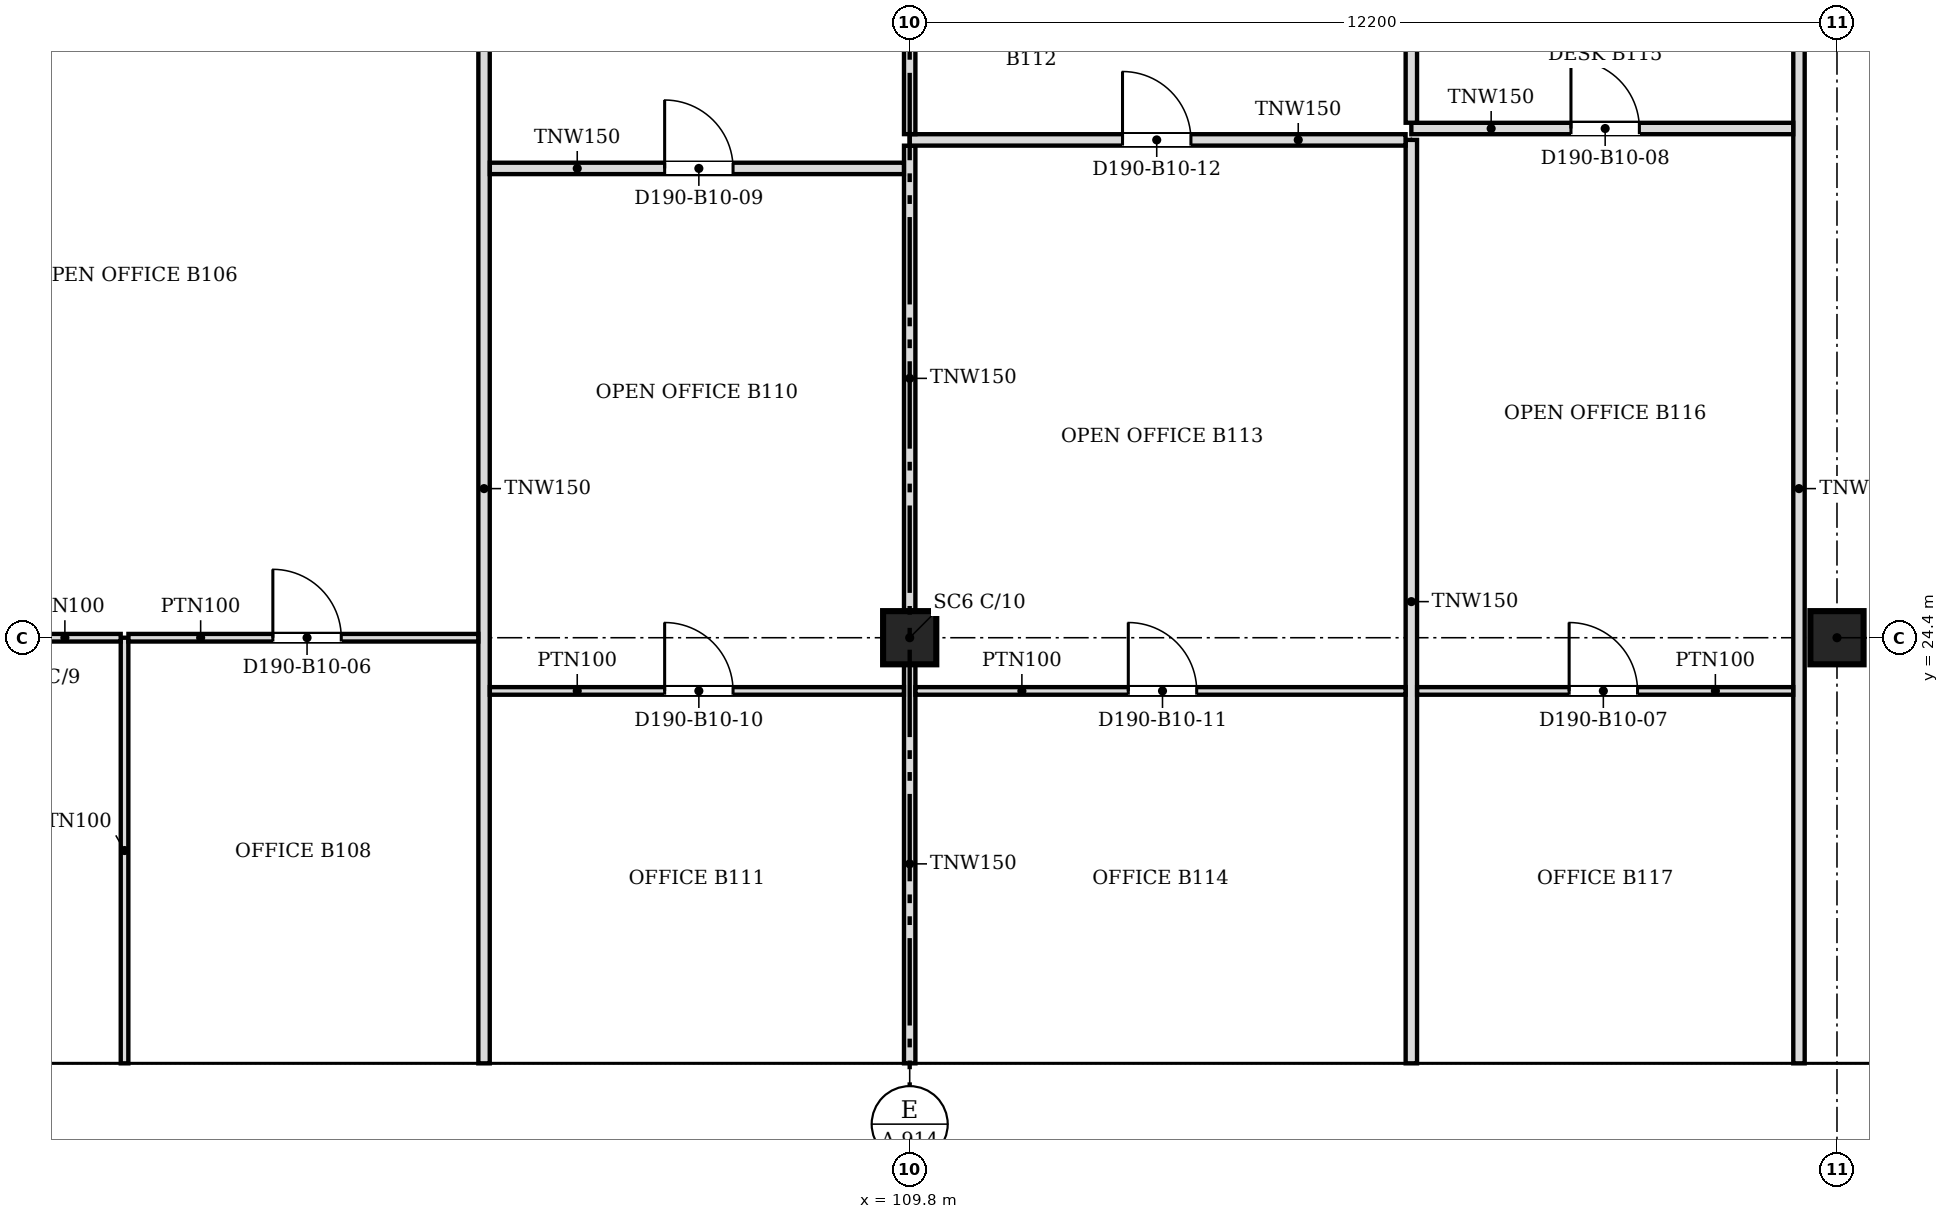
"""IFC4 building model, lengths in metres.
Left out: names, types, materials, properties, quantities, classifications, styles, units other than length and angle.
Written with IfcOpenShell. Run it as: python <this file> out.ifc"""

import sys

from ifc_helpers import new_model, si_unit, direction, frame, frame_2d, origin, origin_2d, place, context, subcontext, project, spatial, polyline, rectangle, outline, extrude, faceted_brep, source, transform, mapped, element, fill, save


model = new_model("IFC4")
c1 = context("Model", 3, precision=1e-05, world=origin(), true_north=direction((0.0, 1.0)))
c2 = subcontext(c1, "Body", "Model", "MODEL_VIEW")
j1 = project(units=[si_unit("LENGTHUNIT", "METRE"), si_unit("PLANEANGLEUNIT", "RADIAN")], contexts=[c1])
p1 = place(None, origin())
s1 = spatial("IfcSite", under=j1, at=p1, CompositionType="ELEMENT")
p2 = place(p1, origin())
s2 = spatial("IfcBuilding", under=s1, at=p2, CompositionType="ELEMENT")
p3 = place(p2, frame((0.0, 0.0, 95.2)))
s3 = spatial("IfcBuildingStorey", under=s2, at=p3, CompositionType="ELEMENT", Elevation=95.2)
for number, where, z_axis, x_axis in (
    (1, (109.8, 24.4, 0.0), (0.0, 0.0, 1.0), (1.0, 0.0, 0.0)),
    (2, (122.0, 24.4, 0.0), (0.0, 0.0, 1.0), (1.0, 0.0, 0.0)),
):
    element("IfcColumn", number, at=place(p3, frame(where, z_axis=z_axis, x_axis=x_axis)), inside=s3, PredefinedType="COLUMN", context=c2, shape_type="SweptSolid", body=[
        extrude(rectangle(XDim=0.7, YDim=0.7, at=origin_2d()), origin(), (0.0, 0.0, 1.0), 3.6),
    ])
m1 = source(origin(), c2, "Body", "Brep", [
    faceted_brep([(6.1, -0.25, 0.0), (3.05, -0.25, 3.8), (0.0, -0.25, 0.0), (6.1, -0.25, 0.0), (0.0, 0.25, 0.0), (3.05, 0.25, 3.8), (6.1, 0.25, 0.0), (6.1, 0.25, 0.0)], [[[0, 1, 2, 3]], [[4, 5, 6, 7]], [[6, 5, 1, 0]], [[5, 4, 2, 1]], [[4, 7, 3, 2]], [[3, 7, 6, 0]]]),
])
p4 = place(p3, frame((94.55, 18.55, 0.0), z_axis=(0.0, 0.0, 1.0), x_axis=(1.0, 0.0, 0.0)))
e3 = element("IfcWall", 3, at=p4, inside=s3, PredefinedType="SOLIDWALL", context=c2, shape_type="MappedRepresentation", body=[
    mapped(m1, transform((0.0, 0.0, 0.0), scale=1.0)),
])
m2 = source(origin(), c2, "Body", "SweptSolid", [
    extrude(outline(polyline([(5.579, 0.25), (3.05, 3.401), (0.521, 0.25), (5.579, 0.25)])), frame((0.0, 0.26, 0.0), z_axis=(0.0, -1.0, 0.0), x_axis=(1.0, 0.0, 0.0)), (0.0, 0.0, 1.0), 0.52),
])
p5 = place(p4, origin())
e4 = element("IfcOpeningElement", 4, at=p5, cuts=e3, PredefinedType="OPENING", context=c2, shape_type="MappedRepresentation", body=[
    mapped(m2, transform((0.0, 0.0, 0.0), scale=1.0)),
])
m3 = source(origin(), c2, "Body", "SweptSolid", [
    extrude(outline(polyline([(6.1, 0.0), (3.05, 3.8), (0.0, 0.0), (6.1, 0.0)])), frame((0.0, 0.25, 0.0), z_axis=(0.0, -1.0, 0.0), x_axis=(1.0, 0.0, 0.0)), (0.0, 0.0, 1.0), 0.5),
])
p6 = place(p3, frame((100.65, 18.55, 0.0), z_axis=(0.0, 0.0, 1.0), x_axis=(1.0, 0.0, 0.0)))
e5 = element("IfcWall", 5, at=p6, inside=s3, PredefinedType="SOLIDWALL", context=c2, shape_type="MappedRepresentation", body=[
    mapped(m3, transform((0.0, 0.0, 0.0), scale=1.0)),
])
p7 = place(p6, origin())
e6 = element("IfcOpeningElement", 6, at=p7, cuts=e5, PredefinedType="OPENING", context=c2, shape_type="MappedRepresentation", body=[
    mapped(m2, transform((0.0, 0.0, 0.0), scale=1.0)),
])
p8 = place(p3, frame((106.75, 18.55, 0.0), z_axis=(0.0, 0.0, 1.0), x_axis=(1.0, 0.0, 0.0)))
e7 = element("IfcWall", 7, at=p8, inside=s3, PredefinedType="SOLIDWALL", context=c2, shape_type="MappedRepresentation", body=[
    mapped(m3, transform((0.0, 0.0, 0.0), scale=1.0)),
])
p9 = place(p8, origin())
e8 = element("IfcOpeningElement", 8, at=p9, cuts=e7, PredefinedType="OPENING", context=c2, shape_type="MappedRepresentation", body=[
    mapped(m2, transform((0.0, 0.0, 0.0), scale=1.0)),
])
p10 = place(p3, frame((112.85, 18.55, 0.0), z_axis=(0.0, 0.0, 1.0), x_axis=(1.0, 0.0, 0.0)))
e9 = element("IfcWall", 9, at=p10, inside=s3, PredefinedType="SOLIDWALL", context=c2, shape_type="MappedRepresentation", body=[
    mapped(m1, transform((0.0, 0.0, 0.0), scale=1.0)),
])
p11 = place(p10, origin())
e10 = element("IfcOpeningElement", 10, at=p11, cuts=e9, PredefinedType="OPENING", context=c2, shape_type="MappedRepresentation", body=[
    mapped(m2, transform((0.0, 0.0, 0.0), scale=1.0)),
])
m4 = source(origin(), c2, "Body", "Brep", [
    faceted_brep([(5.85, -0.25, 0.0), (3.05, -0.25, 3.8), (0.0, -0.25, 0.0), (0.0, 0.25, 0.0), (3.05, 0.25, 3.8), (5.6, 0.25, 0.339), (5.6, 0.25, 0.0), (5.85, 0.0, 0.0)], [[[0, 1, 2]], [[3, 4, 5, 6]], [[5, 4, 1, 0, 7]], [[4, 3, 2, 1]], [[3, 6, 7, 0, 2]], [[7, 6, 5]]]),
])
p12 = place(p3, frame((118.95, 18.55, 0.0), z_axis=(0.0, 0.0, 1.0), x_axis=(1.0, 0.0, 0.0)))
e11 = element("IfcWall", 11, at=p12, inside=s3, PredefinedType="SOLIDWALL", context=c2, shape_type="MappedRepresentation", body=[
    mapped(m4, transform((0.0, 0.0, 0.0), scale=1.0)),
])
m5 = source(origin(), c2, "Body", "SweptSolid", [
    extrude(outline(polyline([(5.355, 0.25), (3.042, 3.39), (0.521, 0.25), (5.355, 0.25)])), frame((0.0, 0.26, 0.0), z_axis=(0.0, -1.0, 0.0), x_axis=(1.0, 0.0, 0.0)), (0.0, 0.0, 1.0), 0.52),
])
p13 = place(p12, origin())
e12 = element("IfcOpeningElement", 12, at=p13, cuts=e11, PredefinedType="OPENING", context=c2, shape_type="MappedRepresentation", body=[
    mapped(m5, transform((0.0, 0.0, 0.0), scale=1.0)),
])
p14 = place(p2, frame((0.0, 0.0, 99.0)))
s4 = spatial("IfcBuildingStorey", under=s2, at=p14, CompositionType="ELEMENT", Elevation=99.0)
m6 = source(origin(), c2, "Body", "Brep", [
    faceted_brep([(3.05, -0.25, 0.0), (6.1, -0.25, 3.8), (6.1, -0.25, 3.8), (3.05, -0.25, 7.6), (0.0, -0.25, 3.8), (0.0, 0.25, 3.8), (3.05, 0.25, 7.6), (6.1, 0.25, 3.8), (6.1, 0.25, 3.8), (3.05, 0.25, 0.0)], [[[0, 1, 2, 3, 4]], [[5, 6, 7, 8, 9]], [[9, 8, 1, 0]], [[7, 6, 3, 2]], [[6, 5, 4, 3]], [[5, 9, 0, 4]], [[1, 8, 7, 2]]]),
])
p15 = place(p14, frame((97.6, 18.55, -3.8), z_axis=(0.0, 0.0, 1.0), x_axis=(1.0, 0.0, 0.0)))
e13 = element("IfcWall", 13, at=p15, inside=s4, PredefinedType="SOLIDWALL", context=c2, shape_type="MappedRepresentation", body=[
    mapped(m6, transform((0.0, 0.0, 0.0), scale=1.0)),
])
m7 = source(origin(), c2, "Body", "SweptSolid", [
    extrude(outline(polyline([(3.05, 0.399), (5.78, 3.8), (3.05, 7.201), (0.321, 3.8), (3.05, 0.399)])), frame((0.0, 0.26, 0.0), z_axis=(0.0, -1.0, 0.0), x_axis=(1.0, 0.0, 0.0)), (0.0, 0.0, 1.0), 0.52),
])
p16 = place(p15, origin())
e14 = element("IfcOpeningElement", 14, at=p16, cuts=e13, PredefinedType="OPENING", context=c2, shape_type="MappedRepresentation", body=[
    mapped(m7, transform((0.0, 0.0, 0.0), scale=1.0)),
])
m8 = source(origin(), c2, "Body", "SweptSolid", [
    extrude(outline(polyline([(3.05, 0.0), (6.1, 3.8), (3.05, 7.6), (0.0, 3.8), (3.05, 0.0)])), frame((0.0, 0.25, 0.0), z_axis=(0.0, -1.0, 0.0), x_axis=(1.0, 0.0, 0.0)), (0.0, 0.0, 1.0), 0.5),
])
p17 = place(p14, frame((103.7, 18.55, -3.8), z_axis=(0.0, 0.0, 1.0), x_axis=(1.0, 0.0, 0.0)))
e15 = element("IfcWall", 15, at=p17, inside=s4, PredefinedType="SOLIDWALL", context=c2, shape_type="MappedRepresentation", body=[
    mapped(m8, transform((0.0, 0.0, 0.0), scale=1.0)),
])
p18 = place(p17, origin())
e16 = element("IfcOpeningElement", 16, at=p18, cuts=e15, PredefinedType="OPENING", context=c2, shape_type="MappedRepresentation", body=[
    mapped(m7, transform((0.0, 0.0, 0.0), scale=1.0)),
])
p19 = place(p14, frame((109.8, 18.55, -3.8), z_axis=(0.0, 0.0, 1.0), x_axis=(1.0, 0.0, 0.0)))
e17 = element("IfcWall", 17, at=p19, inside=s4, PredefinedType="SOLIDWALL", context=c2, shape_type="MappedRepresentation", body=[
    mapped(m6, transform((0.0, 0.0, 0.0), scale=1.0)),
])
p20 = place(p19, origin())
e18 = element("IfcOpeningElement", 18, at=p20, cuts=e17, PredefinedType="OPENING", context=c2, shape_type="MappedRepresentation", body=[
    mapped(m7, transform((0.0, 0.0, 0.0), scale=1.0)),
])
p21 = place(p14, frame((115.9, 18.55, -3.8), z_axis=(0.0, 0.0, 1.0), x_axis=(1.0, 0.0, 0.0)))
e19 = element("IfcWall", 19, at=p21, inside=s4, PredefinedType="SOLIDWALL", context=c2, shape_type="MappedRepresentation", body=[
    mapped(m8, transform((0.0, 0.0, 0.0), scale=1.0)),
])
p22 = place(p21, origin())
e20 = element("IfcOpeningElement", 20, at=p22, cuts=e19, PredefinedType="OPENING", context=c2, shape_type="MappedRepresentation", body=[
    mapped(m7, transform((0.0, 0.0, 0.0), scale=1.0)),
])
m9 = source(origin(), c2, "Body", "Brep", [
    faceted_brep([(2.8, -0.25, 0.0), (3.05, -0.25, 0.339), (3.05, -0.25, 7.261), (2.8, -0.25, 7.6), (0.0, -0.25, 3.8), (0.0, 0.25, 3.8), (2.55, 0.25, 7.261), (2.55, 0.25, 0.339), (2.8, 0.0, 0.0), (2.8, 0.0, 7.6)], [[[0, 1, 2, 3, 4]], [[5, 6, 7]], [[1, 0, 8]], [[9, 3, 2]], [[6, 5, 4, 3, 9]], [[5, 7, 8, 0, 4]], [[1, 8, 7, 6, 9, 2]]]),
])
p23 = place(p14, frame((122.0, 18.55, -3.8), z_axis=(0.0, 0.0, 1.0), x_axis=(1.0, 0.0, 0.0)))
e21 = element("IfcWall", 21, at=p23, inside=s4, PredefinedType="SOLIDWALL", context=c2, shape_type="MappedRepresentation", body=[
    mapped(m9, transform((0.0, 0.0, 0.0), scale=1.0)),
])
m10 = source(origin(), c2, "Body", "SweptSolid", [
    extrude(outline(polyline([(2.6, 6.907), (0.311, 3.8), (2.6, 0.693), (2.6, 6.907)])), frame((0.0, 0.26, 0.0), z_axis=(0.0, -1.0, 0.0), x_axis=(1.0, 0.0, 0.0)), (0.0, 0.0, 1.0), 0.52),
])
p24 = place(p23, origin())
e22 = element("IfcOpeningElement", 22, at=p24, cuts=e21, PredefinedType="OPENING", context=c2, shape_type="MappedRepresentation", body=[
    mapped(m10, transform((0.0, 0.0, 0.0), scale=1.0)),
])
p25 = place(p3, frame((99.47, 18.8, 0.0), z_axis=(0.0, 0.0, 1.0), x_axis=(0.0, 1.0, 0.0)))
e23 = element("IfcWall", 23, at=p25, inside=s3, PredefinedType="PARTITIONING", context=c2, shape_type="SweptSolid", body=[
    extrude(rectangle(XDim=5.6, YDim=0.1, at=frame_2d((2.8, 0.0))), origin(), (0.0, 0.0, 1.0), 3.067),
])
p26 = place(p3, frame((104.2, 18.8, 0.0), z_axis=(0.0, 0.0, 1.0), x_axis=(0.0, 1.0, 0.0)))
e24 = element("IfcWall", 24, at=p26, inside=s3, PredefinedType="PARTITIONING", context=c2, shape_type="SweptSolid", body=[
    extrude(rectangle(XDim=15.124, YDim=0.15, at=frame_2d((7.562, 0.0))), origin(), (0.0, 0.0, 1.0), 3.067),
])
p27 = place(p3, frame((109.8, 18.8, 0.0), z_axis=(0.0, 0.0, 1.0), x_axis=(0.0, 1.0, 0.0)))
e25 = element("IfcWall", 25, at=p27, inside=s3, PredefinedType="PARTITIONING", context=c2, shape_type="SweptSolid", body=[
    extrude(rectangle(XDim=5.249, YDim=0.15, at=frame_2d((2.625, 0.0))), origin(), (0.0, 0.0, 1.0), 3.067),
])
p28 = place(p3, frame((116.4, 18.8, 0.0), z_axis=(0.0, 0.0, 1.0), x_axis=(0.0, 1.0, 0.0)))
e26 = element("IfcWall", 26, at=p28, inside=s3, PredefinedType="PARTITIONING", context=c2, shape_type="SweptSolid", body=[
    extrude(rectangle(XDim=12.15, YDim=0.15, at=frame_2d((6.075, 0.0))), origin(), (0.0, 0.0, 1.0), 3.067),
])
p29 = place(p3, frame((121.5, 18.8, 0.0), z_axis=(0.0, 0.0, 1.0), x_axis=(0.0, 1.0, 0.0)))
e27 = element("IfcWall", 27, at=p29, inside=s3, PredefinedType="PARTITIONING", context=c2, shape_type="SweptSolid", body=[
    extrude(rectangle(XDim=15.124, YDim=0.15, at=frame_2d((7.562, 0.0))), origin(), (0.0, 0.0, 1.0), 3.067),
])
p30 = place(p3, frame((109.724, 23.7, 0.0), z_axis=(0.0, 0.0, 1.0), x_axis=(-1.0, 0.0, 0.0)))
e28 = element("IfcWall", 28, at=p30, inside=s3, PredefinedType="PARTITIONING", context=c2, shape_type="SweptSolid", body=[
    extrude(rectangle(XDim=5.448, YDim=0.1, at=frame_2d((2.724, 0.0))), origin(), (0.0, 0.0, 1.0), 3.067),
])
m11 = source(origin(), c2, "Body", "SweptSolid", [
    extrude(rectangle(XDim=0.9, YDim=2.1, at=frame_2d((0.45, 1.05))), frame((0.0, 0.06, 0.0), z_axis=(0.0, -1.0, 0.0), x_axis=(1.0, 0.0, 0.0)), (0.0, 0.0, 1.0), 0.12),
])
p31 = place(p30, frame((2.248, 0.0, 0.0)))
e29 = element("IfcOpeningElement", 29, at=p31, cuts=e28, PredefinedType="OPENING", context=c2, shape_type="MappedRepresentation", body=[
    mapped(m11, transform((0.0, 0.0, 0.0), scale=1.0)),
])
p32 = place(p3, frame((116.324, 23.7, 0.0), z_axis=(0.0, 0.0, 1.0), x_axis=(-1.0, 0.0, 0.0)))
e30 = element("IfcWall", 30, at=p32, inside=s3, PredefinedType="PARTITIONING", context=c2, shape_type="SweptSolid", body=[
    extrude(rectangle(XDim=6.448, YDim=0.1, at=frame_2d((3.224, 0.0))), origin(), (0.0, 0.0, 1.0), 3.067),
])
p33 = place(p32, frame((2.748, 0.0, 0.0)))
e31 = element("IfcOpeningElement", 31, at=p33, cuts=e30, PredefinedType="OPENING", context=c2, shape_type="MappedRepresentation", body=[
    mapped(m11, transform((0.0, 0.0, 0.0), scale=1.0)),
])
p34 = place(p3, frame((121.424, 23.7, 0.0), z_axis=(0.0, 0.0, 1.0), x_axis=(-1.0, 0.0, 0.0)))
e32 = element("IfcWall", 32, at=p34, inside=s3, PredefinedType="PARTITIONING", context=c2, shape_type="SweptSolid", body=[
    extrude(rectangle(XDim=4.948, YDim=0.1, at=frame_2d((2.474, 0.0))), origin(), (0.0, 0.0, 1.0), 3.067),
])
p35 = place(p34, frame((2.048, 0.0, 0.0)))
e33 = element("IfcOpeningElement", 33, at=p35, cuts=e32, PredefinedType="OPENING", context=c2, shape_type="MappedRepresentation", body=[
    mapped(m11, transform((0.0, 0.0, 0.0), scale=1.0)),
])
p36 = place(p3, frame((97.951, 24.4, 0.0), z_axis=(0.0, 0.0, 1.0), x_axis=(1.0, 0.0, 0.0)))
e34 = element("IfcWall", 34, at=p36, inside=s3, PredefinedType="PARTITIONING", context=c2, shape_type="SweptSolid", body=[
    extrude(rectangle(XDim=1.468, YDim=0.1, at=frame_2d((0.734, 0.0))), origin(), (0.0, 0.0, 1.0), 3.067),
])
p37 = place(p3, frame((104.124, 24.4, 0.0), z_axis=(0.0, 0.0, 1.0), x_axis=(-1.0, 0.0, 0.0)))
e35 = element("IfcWall", 35, at=p37, inside=s3, PredefinedType="PARTITIONING", context=c2, shape_type="SweptSolid", body=[
    extrude(rectangle(XDim=4.603, YDim=0.1, at=frame_2d((2.301, 0.0))), origin(), (0.0, 0.0, 1.0), 3.067),
])
p38 = place(p37, frame((1.803, 0.0, 0.0)))
e36 = element("IfcOpeningElement", 36, at=p38, cuts=e35, PredefinedType="OPENING", context=c2, shape_type="MappedRepresentation", body=[
    mapped(m11, transform((0.0, 0.0, 0.0), scale=1.0)),
])
p39 = place(p3, frame((109.8, 24.751, 0.0), z_axis=(0.0, 0.0, 1.0), x_axis=(0.0, 1.0, 0.0)))
e37 = element("IfcWall", 37, at=p39, inside=s3, PredefinedType="PARTITIONING", context=c2, shape_type="SweptSolid", body=[
    extrude(rectangle(XDim=6.123, YDim=0.15, at=frame_2d((3.062, 0.0))), origin(), (0.0, 0.0, 1.0), 3.067),
])
p40 = place(p3, frame((109.724, 30.575, 0.0), z_axis=(0.0, 0.0, 1.0), x_axis=(-1.0, 0.0, 0.0)))
e38 = element("IfcWall", 38, at=p40, inside=s3, PredefinedType="PARTITIONING", context=c2, shape_type="SweptSolid", body=[
    extrude(rectangle(XDim=5.448, YDim=0.15, at=frame_2d((2.724, 0.0))), origin(), (0.0, 0.0, 1.0), 3.067),
])
m12 = source(origin(), c2, "Body", "SweptSolid", [
    extrude(rectangle(XDim=0.9, YDim=2.1, at=frame_2d((0.45, 1.05))), frame((0.0, 0.085, 0.0), z_axis=(0.0, -1.0, 0.0), x_axis=(1.0, 0.0, 0.0)), (0.0, 0.0, 1.0), 0.17),
])
p41 = place(p40, frame((2.248, 0.0, 0.0)))
e39 = element("IfcOpeningElement", 39, at=p41, cuts=e38, PredefinedType="OPENING", context=c2, shape_type="MappedRepresentation", body=[
    mapped(m12, transform((0.0, 0.0, 0.0), scale=1.0)),
])
p42 = place(p3, frame((116.324, 30.95, 0.0), z_axis=(0.0, 0.0, 1.0), x_axis=(-1.0, 0.0, 0.0)))
e40 = element("IfcWall", 40, at=p42, inside=s3, PredefinedType="PARTITIONING", context=c2, shape_type="SweptSolid", body=[
    extrude(rectangle(XDim=6.524, YDim=0.15, at=frame_2d((3.262, 0.0))), origin(), (0.0, 0.0, 1.0), 3.067),
])
p43 = place(p42, frame((2.824, 0.0, 0.0)))
e41 = element("IfcOpeningElement", 41, at=p43, cuts=e40, PredefinedType="OPENING", context=c2, shape_type="MappedRepresentation", body=[
    mapped(m12, transform((0.0, 0.0, 0.0), scale=1.0)),
])
p44 = place(p3, frame((109.8, 31.026, 0.0), z_axis=(0.0, 0.0, 1.0), x_axis=(0.0, 1.0, 0.0)))
e42 = element("IfcWall", 42, at=p44, inside=s3, PredefinedType="PARTITIONING", context=c2, shape_type="SweptSolid", body=[
    extrude(rectangle(XDim=2.898, YDim=0.15, at=frame_2d((1.449, 0.0))), origin(), (0.0, 0.0, 1.0), 3.067),
])
p45 = place(p3, frame((121.424, 31.1, 0.0), z_axis=(0.0, 0.0, 1.0), x_axis=(-1.0, 0.0, 0.0)))
e43 = element("IfcWall", 43, at=p45, inside=s3, PredefinedType="PARTITIONING", context=c2, shape_type="SweptSolid", body=[
    extrude(rectangle(XDim=5.024, YDim=0.15, at=frame_2d((2.512, 0.0))), origin(), (0.0, 0.0, 1.0), 3.067),
])
p46 = place(p45, frame((2.024, 0.0, 0.0)))
e44 = element("IfcOpeningElement", 44, at=p46, cuts=e43, PredefinedType="OPENING", context=c2, shape_type="MappedRepresentation", body=[
    mapped(m12, transform((0.0, 0.0, 0.0), scale=1.0)),
])
p47 = place(p3, frame((116.4, 31.176, 0.0), z_axis=(0.0, 0.0, 1.0), x_axis=(0.0, 1.0, 0.0)))
e45 = element("IfcWall", 45, at=p47, inside=s3, PredefinedType="PARTITIONING", context=c2, shape_type="SweptSolid", body=[
    extrude(rectangle(XDim=2.748, YDim=0.15, at=frame_2d((1.374, 0.0))), origin(), (0.0, 0.0, 1.0), 3.067),
])
m13 = source(origin(), c2, "Body", "SweptSolid", [
    extrude(rectangle(XDim=0.9, YDim=2.1, at=frame_2d((0.45, 1.05))), frame((0.0, 0.025, 0.0), z_axis=(0.0, -1.0, 0.0), x_axis=(1.0, 0.0, 0.0)), (0.0, 0.0, 1.0), 0.05),
])
p48 = place(p38, origin())
e46 = element("IfcDoor", 46, at=p48, inside=s3, OperationType="SINGLE_SWING_RIGHT", PredefinedType="DOOR", context=c2, shape_type="MappedRepresentation", body=[
    mapped(m13, transform((0.0, 0.0, 0.0), scale=1.0)),
])
fill(e36, e46)
p49 = place(p35, origin())
e47 = element("IfcDoor", 47, at=p49, inside=s3, OperationType="SINGLE_SWING_RIGHT", PredefinedType="DOOR", context=c2, shape_type="MappedRepresentation", body=[
    mapped(m13, transform((0.0, 0.0, 0.0), scale=1.0)),
])
fill(e33, e47)
p50 = place(p46, origin())
e48 = element("IfcDoor", 48, at=p50, inside=s3, OperationType="SINGLE_SWING_RIGHT", PredefinedType="DOOR", context=c2, shape_type="MappedRepresentation", body=[
    mapped(m13, transform((0.0, 0.0, 0.0), scale=1.0)),
])
fill(e44, e48)
p51 = place(p41, origin())
e49 = element("IfcDoor", 49, at=p51, inside=s3, OperationType="SINGLE_SWING_RIGHT", PredefinedType="DOOR", context=c2, shape_type="MappedRepresentation", body=[
    mapped(m13, transform((0.0, 0.0, 0.0), scale=1.0)),
])
fill(e39, e49)
p52 = place(p31, origin())
e50 = element("IfcDoor", 50, at=p52, inside=s3, OperationType="SINGLE_SWING_RIGHT", PredefinedType="DOOR", context=c2, shape_type="MappedRepresentation", body=[
    mapped(m13, transform((0.0, 0.0, 0.0), scale=1.0)),
])
fill(e29, e50)
p53 = place(p33, origin())
e51 = element("IfcDoor", 51, at=p53, inside=s3, OperationType="SINGLE_SWING_RIGHT", PredefinedType="DOOR", context=c2, shape_type="MappedRepresentation", body=[
    mapped(m13, transform((0.0, 0.0, 0.0), scale=1.0)),
])
fill(e31, e51)
p54 = place(p43, origin())
e52 = element("IfcDoor", 52, at=p54, inside=s3, OperationType="SINGLE_SWING_RIGHT", PredefinedType="DOOR", context=c2, shape_type="MappedRepresentation", body=[
    mapped(m13, transform((0.0, 0.0, 0.0), scale=1.0)),
])
fill(e41, e52)
save(model, sys.argv[1])
